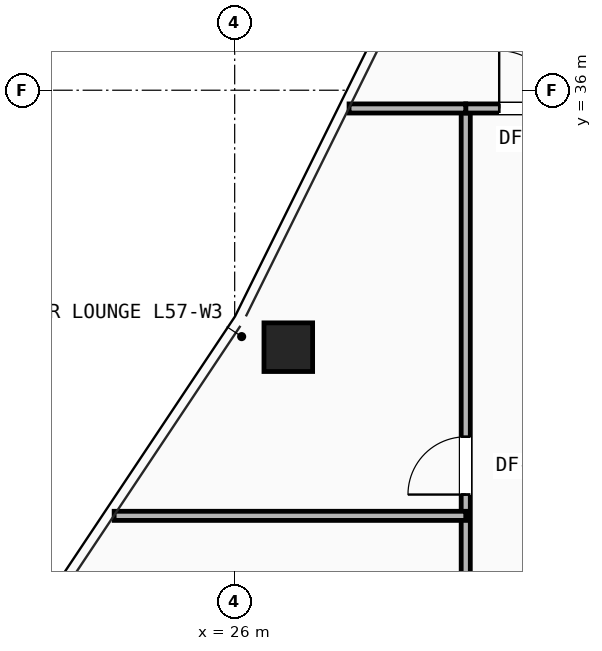
"""IFC4 building model, lengths in metres.
Left out: names, types, materials, properties, quantities, classifications, styles, units other than length and angle.
Written with IfcOpenShell. Run it as: python <this file> out.ifc"""

import sys

from ifc_helpers import new_model, si_unit, direction, frame, frame_2d, origin, origin_2d, place, context, subcontext, project, spatial, rectangle, hollow_rectangle, extrude, element, fill, save


model = new_model("IFC4")
c1 = context("Model", 3, precision=1e-05, world=origin(), true_north=direction((0.0, 1.0)))
c2 = subcontext(c1, "Body", "Model", "MODEL_VIEW")
j1 = project(units=[si_unit("LENGTHUNIT", "METRE"), si_unit("PLANEANGLEUNIT", "RADIAN")], contexts=[c1])
p1 = place(None, origin())
s1 = spatial("IfcSite", under=j1, at=p1, CompositionType="ELEMENT")
p2 = place(p1, origin())
s2 = spatial("IfcBuilding", under=s1, at=p2, CompositionType="ELEMENT")
p3 = place(p2, frame((0.0, 0.0, 200.7)))
s3 = spatial("IfcBuildingStorey", under=s2, at=p3, CompositionType="ELEMENT", Elevation=200.7)
p4 = place(p3, frame((26.882, 31.774, 0.0), z_axis=(0.0, 0.0, 1.0), x_axis=(1.0, 0.0, 0.0)))
e1 = element("IfcColumn", 1, at=p4, inside=s3, PredefinedType="COLUMN", context=c2, shape_type="SweptSolid", body=[
    extrude(hollow_rectangle(XDim=0.8, YDim=0.8, WallThickness=0.055, at=origin_2d()), origin(), (0.0, 0.0, 1.0), 4.2),
])
p5 = place(p3, frame((29.8, 16.4, 0.0), z_axis=(0.0, 0.0, 1.0), x_axis=(0.0, 1.0, 0.0)))
e2 = element("IfcWall", 2, at=p5, inside=s3, PredefinedType="PARTITIONING", context=c2, shape_type="SweptSolid", body=[
    extrude(rectangle(XDim=19.3, YDim=0.15, at=frame_2d((9.65, 0.0))), origin(), (0.0, 0.0, 1.0), 2.965),
])
p6 = place(p5, frame((0.35, 0.0, 0.0)))
e3 = element("IfcOpeningElement", 3, at=p6, cuts=e2, PredefinedType="OPENING", context=c2, shape_type="SweptSolid", body=[
    extrude(rectangle(XDim=0.95, YDim=2.1, at=frame_2d((0.475, 1.05))), frame((0.0, 0.085, 0.0), z_axis=(0.0, -1.0, 0.0), x_axis=(1.0, 0.0, 0.0)), (0.0, 0.0, 1.0), 0.17),
])
p7 = place(p5, frame((5.95, 0.0, 0.0)))
e4 = element("IfcOpeningElement", 4, at=p7, cuts=e2, PredefinedType="OPENING", context=c2, shape_type="SweptSolid", body=[
    extrude(rectangle(XDim=0.95, YDim=2.1, at=frame_2d((0.475, 1.05))), frame((0.0, 0.085, 0.0), z_axis=(0.0, -1.0, 0.0), x_axis=(1.0, 0.0, 0.0)), (0.0, 0.0, 1.0), 0.17),
])
p8 = place(p5, frame((12.95, 0.0, 0.0)))
e5 = element("IfcOpeningElement", 5, at=p8, cuts=e2, PredefinedType="OPENING", context=c2, shape_type="SweptSolid", body=[
    extrude(rectangle(XDim=0.95, YDim=2.1, at=frame_2d((0.475, 1.05))), frame((0.0, 0.085, 0.0), z_axis=(0.0, -1.0, 0.0), x_axis=(1.0, 0.0, 0.0)), (0.0, 0.0, 1.0), 0.17),
])
p9 = place(p3, frame((29.8, 35.7, 0.0), z_axis=(0.0, 0.0, 1.0), x_axis=(1.0, 0.0, 0.0)))
e6 = element("IfcWall", 6, at=p9, inside=s3, PredefinedType="PARTITIONING", context=c2, shape_type="SweptSolid", body=[
    extrude(rectangle(XDim=9.45, YDim=0.15, at=frame_2d((4.725, 0.0))), origin(), (0.0, 0.0, 1.0), 3.533),
])
p10 = place(p9, frame((0.55, 0.0, 0.0)))
e7 = element("IfcOpeningElement", 7, at=p10, cuts=e6, PredefinedType="OPENING", context=c2, shape_type="SweptSolid", body=[
    extrude(rectangle(XDim=0.95, YDim=2.1, at=frame_2d((0.475, 1.05))), frame((0.0, 0.085, 0.0), z_axis=(0.0, -1.0, 0.0), x_axis=(1.0, 0.0, 0.0)), (0.0, 0.0, 1.0), 0.17),
])
p11 = place(p3, frame((27.881, 35.7, 0.0), z_axis=(0.0, 0.0, 1.0), x_axis=(1.0, 0.0, 0.0)))
e8 = element("IfcWall", 8, at=p11, inside=s3, PredefinedType="PARTITIONING", context=c2, shape_type="SweptSolid", body=[
    extrude(rectangle(XDim=1.919, YDim=0.15, at=frame_2d((0.959, 0.0))), origin(), (0.0, 0.0, 1.0), 3.329),
])
p12 = place(p3, frame((24.018, 29.0, 0.0), z_axis=(0.0, 0.0, 1.0), x_axis=(1.0, 0.0, 0.0)))
e9 = element("IfcWall", 9, at=p12, inside=s3, PredefinedType="PARTITIONING", context=c2, shape_type="SweptSolid", body=[
    extrude(rectangle(XDim=5.782, YDim=0.15, at=frame_2d((2.891, 0.0))), origin(), (0.0, 0.0, 1.0), 3.329),
])
p13 = place(p8, origin())
e10 = element("IfcDoor", 10, at=p13, inside=s3, OperationType="SINGLE_SWING_LEFT", PredefinedType="DOOR", context=c2, shape_type="SweptSolid", body=[
    extrude(rectangle(XDim=0.95, YDim=2.1, at=frame_2d((0.475, 1.05))), frame((0.0, 0.025, 0.0), z_axis=(0.0, -1.0, 0.0), x_axis=(1.0, 0.0, 0.0)), (0.0, 0.0, 1.0), 0.05),
])
fill(e5, e10)
p14 = place(p10, origin())
e11 = element("IfcDoor", 11, at=p14, inside=s3, OperationType="SINGLE_SWING_LEFT", PredefinedType="DOOR", context=c2, shape_type="SweptSolid", body=[
    extrude(rectangle(XDim=0.95, YDim=2.1, at=frame_2d((0.475, 1.05))), frame((0.0, 0.025, 0.0), z_axis=(0.0, -1.0, 0.0), x_axis=(1.0, 0.0, 0.0)), (0.0, 0.0, 1.0), 0.05),
])
fill(e7, e11)
save(model, sys.argv[1])
